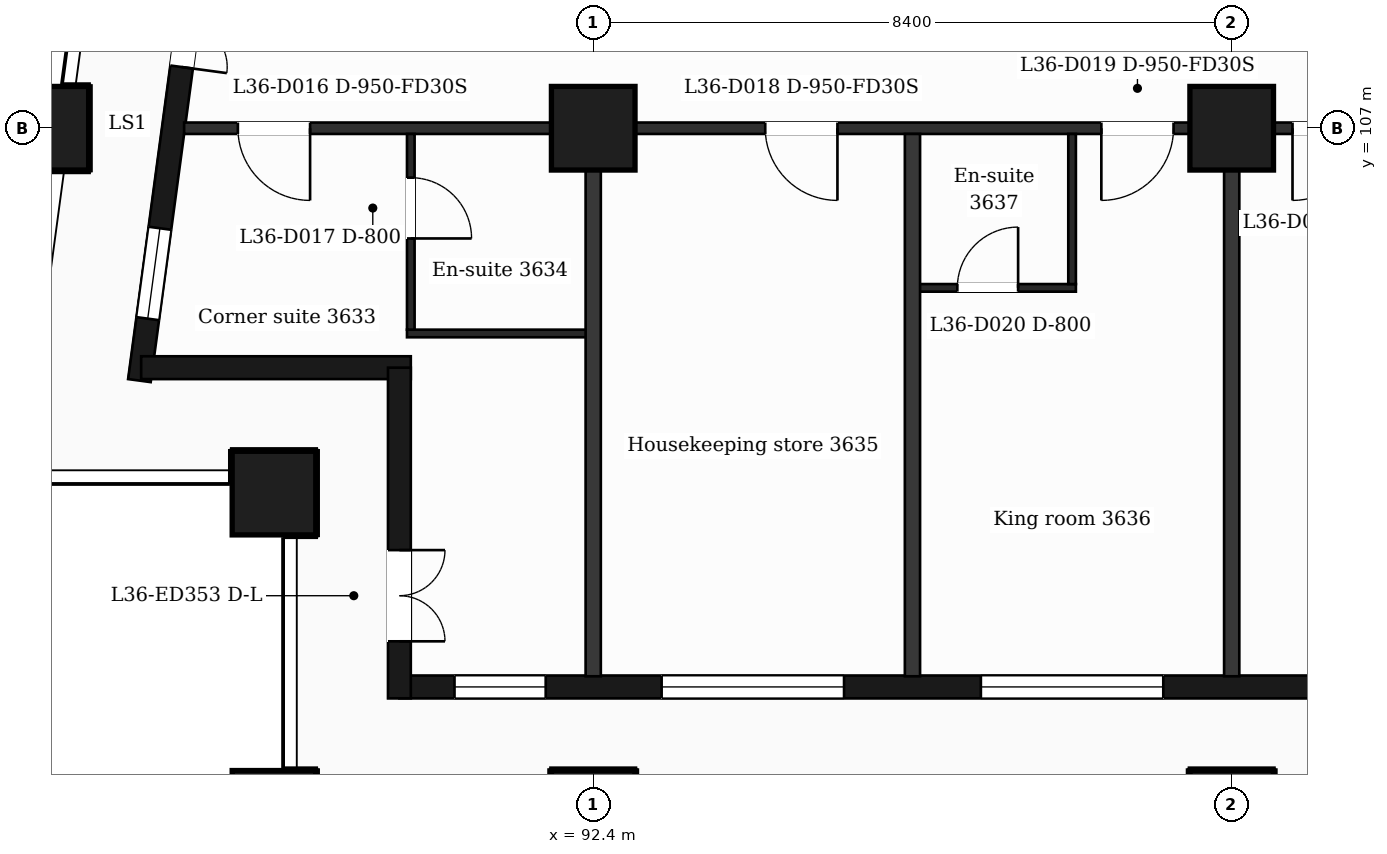
"""IFC4 building model, lengths in metres.
Left out: names, types, materials, properties, quantities, classifications, styles, units other than length and angle.
Written with IfcOpenShell. Run it as: python <this file> out.ifc"""

import sys

from ifc_helpers import new_model, si_unit, direction, frame, frame_2d, origin, origin_2d, place, context, subcontext, project, spatial, rectangle, extrude, element, fill, save


model = new_model("IFC4")
c1 = context("Model", 3, precision=1e-05, world=origin(), true_north=direction((0.0, 1.0)))
c2 = subcontext(c1, "Body", "Model", "MODEL_VIEW")
j1 = project(units=[si_unit("LENGTHUNIT", "METRE"), si_unit("PLANEANGLEUNIT", "RADIAN")], contexts=[c1])
p1 = place(None, origin())
s1 = spatial("IfcSite", under=j1, at=p1, CompositionType="ELEMENT")
p2 = place(p1, origin())
s2 = spatial("IfcBuilding", under=s1, at=p2, CompositionType="ELEMENT")
p3 = place(p2, frame((0.0, 0.0, 155.2)))
s3 = spatial("IfcBuildingStorey", under=s2, at=p3, CompositionType="ELEMENT", Elevation=155.2)
for number, where, z_axis, x_axis in (
    (1, (92.4, 98.0, 0.0), (0.0, 0.0, 1.0), (1.0, 0.0, 0.0)),
    (2, (100.8, 98.0, 0.0), (0.0, 0.0, 1.0), (1.0, 0.0, 0.0)),
    (3, (88.2, 98.0, 0.0), (0.0, 0.0, 1.0), (1.0, 0.0, 0.0)),
    (4, (88.2, 102.2, 0.0), (0.0, 0.0, 1.0), (1.0, 0.0, 0.0)),
    (5, (92.4, 107.0, 0.0), (0.0, 0.0, 1.0), (1.0, 0.0, 0.0)),
    (6, (100.8, 107.0, 0.0), (0.0, 0.0, 1.0), (1.0, 0.0, 0.0)),
    (7, (85.211, 107.0, 0.0), (0.0, 0.0, 1.0), (1.0, 0.0, 0.0)),
):
    element("IfcColumn", number, at=place(p3, frame(where, z_axis=z_axis, x_axis=x_axis)), inside=s3, PredefinedType="COLUMN", context=c2, shape_type="SweptSolid", body=[
        extrude(rectangle(XDim=1.1, YDim=1.1, at=origin_2d()), origin(), (0.0, 0.0, 1.0), 3.7),
    ])
p4 = place(p3, frame((89.85, 99.65, 0.0), z_axis=(0.0, 0.0, 1.0), x_axis=(1.0, 0.0, 0.0)))
e8 = element("IfcWall", 8, at=p4, inside=s3, PredefinedType="SOLIDWALL", context=c2, shape_type="SweptSolid", body=[
    extrude(rectangle(XDim=47.25, YDim=0.3, at=frame_2d((23.625, 0.0))), origin(), (0.0, 0.0, 1.0), 3.38),
])
p5 = place(p4, frame((0.725, 0.0, 0.9)))
e9 = element("IfcOpeningElement", 9, at=p5, cuts=e8, PredefinedType="OPENING", context=c2, shape_type="SweptSolid", body=[
    extrude(rectangle(XDim=1.2, YDim=2.1, at=frame_2d((0.6, 1.05))), frame((0.0, 0.16, 0.0), z_axis=(0.0, -1.0, 0.0), x_axis=(1.0, 0.0, 0.0)), (0.0, 0.0, 1.0), 0.32),
])
p6 = place(p4, frame((3.45, 0.0, 0.9)))
e10 = element("IfcOpeningElement", 10, at=p6, cuts=e8, PredefinedType="OPENING", context=c2, shape_type="SweptSolid", body=[
    extrude(rectangle(XDim=2.4, YDim=2.1, at=frame_2d((1.2, 1.05))), frame((0.0, 0.16, 0.0), z_axis=(0.0, -1.0, 0.0), x_axis=(1.0, 0.0, 0.0)), (0.0, 0.0, 1.0), 0.32),
])
p7 = place(p4, frame((7.65, 0.0, 0.9)))
e11 = element("IfcOpeningElement", 11, at=p7, cuts=e8, PredefinedType="OPENING", context=c2, shape_type="SweptSolid", body=[
    extrude(rectangle(XDim=2.4, YDim=2.1, at=frame_2d((1.2, 1.05))), frame((0.0, 0.16, 0.0), z_axis=(0.0, -1.0, 0.0), x_axis=(1.0, 0.0, 0.0)), (0.0, 0.0, 1.0), 0.32),
])
p8 = place(p4, frame((12.45, 0.0, 0.9)))
e12 = element("IfcOpeningElement", 12, at=p8, cuts=e8, PredefinedType="OPENING", context=c2, shape_type="SweptSolid", body=[
    extrude(rectangle(XDim=1.2, YDim=2.1, at=frame_2d((0.6, 1.05))), frame((0.0, 0.16, 0.0), z_axis=(0.0, -1.0, 0.0), x_axis=(1.0, 0.0, 0.0)), (0.0, 0.0, 1.0), 0.32),
])
p9 = place(p4, frame((16.65, 0.0, 0.9)))
e13 = element("IfcOpeningElement", 13, at=p9, cuts=e8, PredefinedType="OPENING", context=c2, shape_type="SweptSolid", body=[
    extrude(rectangle(XDim=1.2, YDim=2.1, at=frame_2d((0.6, 1.05))), frame((0.0, 0.16, 0.0), z_axis=(0.0, -1.0, 0.0), x_axis=(1.0, 0.0, 0.0)), (0.0, 0.0, 1.0), 0.32),
])
p10 = place(p4, frame((19.95, 0.0, 0.0)))
e14 = element("IfcOpeningElement", 14, at=p10, cuts=e8, PredefinedType="OPENING", context=c2, shape_type="SweptSolid", body=[
    extrude(rectangle(XDim=1.2, YDim=2.4, at=frame_2d((0.6, 1.2))), frame((0.0, 0.16, 0.0), z_axis=(0.0, -1.0, 0.0), x_axis=(1.0, 0.0, 0.0)), (0.0, 0.0, 1.0), 0.32),
])
p11 = place(p4, frame((21.75, 0.0, 0.9)))
e15 = element("IfcOpeningElement", 15, at=p11, cuts=e8, PredefinedType="OPENING", context=c2, shape_type="SweptSolid", body=[
    extrude(rectangle(XDim=1.2, YDim=2.1, at=frame_2d((0.6, 1.05))), frame((0.0, 0.16, 0.0), z_axis=(0.0, -1.0, 0.0), x_axis=(1.0, 0.0, 0.0)), (0.0, 0.0, 1.0), 0.32),
])
p12 = place(p4, frame((24.45, 0.0, 0.9)))
e16 = element("IfcOpeningElement", 16, at=p12, cuts=e8, PredefinedType="OPENING", context=c2, shape_type="SweptSolid", body=[
    extrude(rectangle(XDim=2.4, YDim=2.1, at=frame_2d((1.2, 1.05))), frame((0.0, 0.16, 0.0), z_axis=(0.0, -1.0, 0.0), x_axis=(1.0, 0.0, 0.0)), (0.0, 0.0, 1.0), 0.32),
])
p13 = place(p4, frame((28.35, 0.0, 0.0)))
e17 = element("IfcOpeningElement", 17, at=p13, cuts=e8, PredefinedType="OPENING", context=c2, shape_type="SweptSolid", body=[
    extrude(rectangle(XDim=1.2, YDim=2.4, at=frame_2d((0.6, 1.2))), frame((0.0, 0.16, 0.0), z_axis=(0.0, -1.0, 0.0), x_axis=(1.0, 0.0, 0.0)), (0.0, 0.0, 1.0), 0.32),
])
p14 = place(p4, frame((30.15, 0.0, 0.9)))
e18 = element("IfcOpeningElement", 18, at=p14, cuts=e8, PredefinedType="OPENING", context=c2, shape_type="SweptSolid", body=[
    extrude(rectangle(XDim=1.2, YDim=2.1, at=frame_2d((0.6, 1.05))), frame((0.0, 0.16, 0.0), z_axis=(0.0, -1.0, 0.0), x_axis=(1.0, 0.0, 0.0)), (0.0, 0.0, 1.0), 0.32),
])
p15 = place(p4, frame((32.85, 0.0, 0.9)))
e19 = element("IfcOpeningElement", 19, at=p15, cuts=e8, PredefinedType="OPENING", context=c2, shape_type="SweptSolid", body=[
    extrude(rectangle(XDim=2.4, YDim=2.1, at=frame_2d((1.2, 1.05))), frame((0.0, 0.16, 0.0), z_axis=(0.0, -1.0, 0.0), x_axis=(1.0, 0.0, 0.0)), (0.0, 0.0, 1.0), 0.32),
])
p16 = place(p4, frame((37.05, 0.0, 0.9)))
e20 = element("IfcOpeningElement", 20, at=p16, cuts=e8, PredefinedType="OPENING", context=c2, shape_type="SweptSolid", body=[
    extrude(rectangle(XDim=2.4, YDim=2.1, at=frame_2d((1.2, 1.05))), frame((0.0, 0.16, 0.0), z_axis=(0.0, -1.0, 0.0), x_axis=(1.0, 0.0, 0.0)), (0.0, 0.0, 1.0), 0.32),
])
p17 = place(p4, frame((41.85, 0.0, 0.9)))
e21 = element("IfcOpeningElement", 21, at=p17, cuts=e8, PredefinedType="OPENING", context=c2, shape_type="SweptSolid", body=[
    extrude(rectangle(XDim=1.2, YDim=2.1, at=frame_2d((0.6, 1.05))), frame((0.0, 0.16, 0.0), z_axis=(0.0, -1.0, 0.0), x_axis=(1.0, 0.0, 0.0)), (0.0, 0.0, 1.0), 0.32),
])
p18 = place(p4, frame((45.25, 0.0, 0.9)))
e22 = element("IfcOpeningElement", 22, at=p18, cuts=e8, PredefinedType="OPENING", context=c2, shape_type="SweptSolid", body=[
    extrude(rectangle(XDim=1.2, YDim=2.1, at=frame_2d((0.6, 1.05))), frame((0.0, 0.16, 0.0), z_axis=(0.0, -1.0, 0.0), x_axis=(1.0, 0.0, 0.0)), (0.0, 0.0, 1.0), 0.32),
])
p19 = place(p3, frame((87.334, 110.4, 0.0), z_axis=(0.0, 0.0, 1.0), x_axis=(-0.133437175554, -0.991057273915, 0.0)))
e23 = element("IfcWall", 23, at=p19, inside=s3, PredefinedType="SOLIDWALL", context=c2, shape_type="SweptSolid", body=[
    extrude(rectangle(XDim=6.781, YDim=0.3, at=frame_2d((3.39, 0.0))), origin(), (0.0, 0.0, 1.0), 3.38),
])
p20 = place(p19, frame((1.418, 0.0, 0.0)))
e24 = element("IfcOpeningElement", 24, at=p20, cuts=e23, PredefinedType="OPENING", context=c2, shape_type="SweptSolid", body=[
    extrude(rectangle(XDim=1.2, YDim=2.4, at=frame_2d((0.6, 1.2))), frame((0.0, 0.16, 0.0), z_axis=(0.0, -1.0, 0.0), x_axis=(1.0, 0.0, 0.0)), (0.0, 0.0, 1.0), 0.32),
])
p21 = place(p19, frame((4.758, 0.0, 0.9)))
e25 = element("IfcOpeningElement", 25, at=p21, cuts=e23, PredefinedType="OPENING", context=c2, shape_type="SweptSolid", body=[
    extrude(rectangle(XDim=1.2, YDim=2.1, at=frame_2d((0.6, 1.05))), frame((0.0, 0.16, 0.0), z_axis=(0.0, -1.0, 0.0), x_axis=(1.0, 0.0, 0.0)), (0.0, 0.0, 1.0), 0.32),
])
p22 = place(p3, frame((86.452, 103.85, 0.0), z_axis=(0.0, 0.0, 1.0), x_axis=(1.0, 0.0, 0.0)))
e26 = element("IfcWall", 26, at=p22, inside=s3, PredefinedType="SOLIDWALL", context=c2, shape_type="SweptSolid", body=[
    extrude(rectangle(XDim=3.548, YDim=0.3, at=frame_2d((1.774, 0.0))), origin(), (0.0, 0.0, 1.0), 3.38),
])
p23 = place(p3, frame((89.85, 103.85, 0.0), z_axis=(0.0, 0.0, 1.0), x_axis=(0.0, -1.0, 0.0)))
e27 = element("IfcWall", 27, at=p23, inside=s3, PredefinedType="SOLIDWALL", context=c2, shape_type="SweptSolid", body=[
    extrude(rectangle(XDim=4.35, YDim=0.3, at=frame_2d((2.175, 0.0))), origin(), (0.0, 0.0, 1.0), 3.38),
])
p24 = place(p23, frame((2.4, 0.0, 0.0)))
e28 = element("IfcOpeningElement", 28, at=p24, cuts=e27, PredefinedType="OPENING", context=c2, shape_type="SweptSolid", body=[
    extrude(rectangle(XDim=1.2, YDim=2.4, at=frame_2d((0.6, 1.2))), frame((0.0, 0.16, 0.0), z_axis=(0.0, -1.0, 0.0), x_axis=(1.0, 0.0, 0.0)), (0.0, 0.0, 1.0), 0.32),
])
p25 = place(p3, frame((89.95, 104.3, 0.0), z_axis=(0.0, 0.0, 1.0), x_axis=(1.0, 0.0, 0.0)))
e29 = element("IfcWall", 29, at=p25, inside=s3, PredefinedType="PARTITIONING", context=c2, shape_type="SweptSolid", body=[
    extrude(rectangle(XDim=2.45, YDim=0.1, at=frame_2d((1.225, 0.0))), origin(), (0.0, 0.0, 1.0), 3.38),
])
p26 = place(p3, frame((96.6, 104.9, 0.0), z_axis=(0.0, 0.0, 1.0), x_axis=(1.0, 0.0, 0.0)))
e30 = element("IfcWall", 30, at=p26, inside=s3, PredefinedType="PARTITIONING", context=c2, shape_type="SweptSolid", body=[
    extrude(rectangle(XDim=2.15, YDim=0.1, at=frame_2d((1.075, 0.0))), origin(), (0.0, 0.0, 1.0), 3.38),
])
p27 = place(p26, frame((0.59, 0.0, 0.0)))
e31 = element("IfcOpeningElement", 31, at=p27, cuts=e30, PredefinedType="OPENING", context=c2, shape_type="SweptSolid", body=[
    extrude(rectangle(XDim=0.8, YDim=2.1, at=frame_2d((0.4, 1.05))), frame((0.0, 0.06, 0.0), z_axis=(0.0, -1.0, 0.0), x_axis=(1.0, 0.0, 0.0)), (0.0, 0.0, 1.0), 0.12),
])
p28 = place(p3, frame((87.018, 107.0, 0.0), z_axis=(0.0, 0.0, 1.0), x_axis=(1.0, 0.0, 0.0)))
e32 = element("IfcWall", 32, at=p28, inside=s3, PredefinedType="PARTITIONING", context=c2, shape_type="SweptSolid", body=[
    extrude(rectangle(XDim=52.765, YDim=0.15, at=frame_2d((26.382, 0.0))), origin(), (0.0, 0.0, 1.0), 3.38),
])
p29 = place(p28, frame((0.707, 0.0, 0.0)))
e33 = element("IfcOpeningElement", 33, at=p29, cuts=e32, PredefinedType="OPENING", context=c2, shape_type="SweptSolid", body=[
    extrude(rectangle(XDim=0.95, YDim=2.1, at=frame_2d((0.475, 1.05))), frame((0.0, 0.085, 0.0), z_axis=(0.0, -1.0, 0.0), x_axis=(1.0, 0.0, 0.0)), (0.0, 0.0, 1.0), 0.17),
])
p30 = place(p28, frame((7.645, 0.0, 0.0)))
e34 = element("IfcOpeningElement", 34, at=p30, cuts=e32, PredefinedType="OPENING", context=c2, shape_type="SweptSolid", body=[
    extrude(rectangle(XDim=0.95, YDim=2.1, at=frame_2d((0.475, 1.05))), frame((0.0, 0.085, 0.0), z_axis=(0.0, -1.0, 0.0), x_axis=(1.0, 0.0, 0.0)), (0.0, 0.0, 1.0), 0.17),
])
p31 = place(p28, frame((12.067, 0.0, 0.0)))
e35 = element("IfcOpeningElement", 35, at=p31, cuts=e32, PredefinedType="OPENING", context=c2, shape_type="SweptSolid", body=[
    extrude(rectangle(XDim=0.95, YDim=2.1, at=frame_2d((0.475, 1.05))), frame((0.0, 0.085, 0.0), z_axis=(0.0, -1.0, 0.0), x_axis=(1.0, 0.0, 0.0)), (0.0, 0.0, 1.0), 0.17),
])
p32 = place(p28, frame((14.582, 0.0, 0.0)))
e36 = element("IfcOpeningElement", 36, at=p32, cuts=e32, PredefinedType="OPENING", context=c2, shape_type="SweptSolid", body=[
    extrude(rectangle(XDim=0.95, YDim=2.1, at=frame_2d((0.475, 1.05))), frame((0.0, 0.085, 0.0), z_axis=(0.0, -1.0, 0.0), x_axis=(1.0, 0.0, 0.0)), (0.0, 0.0, 1.0), 0.17),
])
p33 = place(p28, frame((20.432, 0.0, 0.0)))
e37 = element("IfcOpeningElement", 37, at=p33, cuts=e32, PredefinedType="OPENING", context=c2, shape_type="SweptSolid", body=[
    extrude(rectangle(XDim=0.95, YDim=2.1, at=frame_2d((0.475, 1.05))), frame((0.0, 0.085, 0.0), z_axis=(0.0, -1.0, 0.0), x_axis=(1.0, 0.0, 0.0)), (0.0, 0.0, 1.0), 0.17),
])
p34 = place(p28, frame((23.532, 0.0, 0.0)))
e38 = element("IfcOpeningElement", 38, at=p34, cuts=e32, PredefinedType="OPENING", context=c2, shape_type="SweptSolid", body=[
    extrude(rectangle(XDim=1.0, YDim=2.1, at=frame_2d((0.5, 1.05))), frame((0.0, 0.085, 0.0), z_axis=(0.0, -1.0, 0.0), x_axis=(1.0, 0.0, 0.0)), (0.0, 0.0, 1.0), 0.17),
])
p35 = place(p28, frame((36.807, 0.0, 0.0)))
e39 = element("IfcOpeningElement", 39, at=p35, cuts=e32, PredefinedType="OPENING", context=c2, shape_type="SweptSolid", body=[
    extrude(rectangle(XDim=1.0, YDim=2.1, at=frame_2d((0.5, 1.05))), frame((0.0, 0.085, 0.0), z_axis=(0.0, -1.0, 0.0), x_axis=(1.0, 0.0, 0.0)), (0.0, 0.0, 1.0), 0.17),
])
p36 = place(p28, frame((43.457, 0.0, 0.0)))
e40 = element("IfcOpeningElement", 40, at=p36, cuts=e32, PredefinedType="OPENING", context=c2, shape_type="SweptSolid", body=[
    extrude(rectangle(XDim=0.95, YDim=2.1, at=frame_2d((0.475, 1.05))), frame((0.0, 0.085, 0.0), z_axis=(0.0, -1.0, 0.0), x_axis=(1.0, 0.0, 0.0)), (0.0, 0.0, 1.0), 0.17),
])
p37 = place(p28, frame((48.974, 0.0, 0.0)))
e41 = element("IfcOpeningElement", 41, at=p37, cuts=e32, PredefinedType="OPENING", context=c2, shape_type="SweptSolid", body=[
    extrude(rectangle(XDim=0.95, YDim=2.1, at=frame_2d((0.475, 1.05))), frame((0.0, 0.085, 0.0), z_axis=(0.0, -1.0, 0.0), x_axis=(1.0, 0.0, 0.0)), (0.0, 0.0, 1.0), 0.17),
])
p38 = place(p3, frame((90.0, 104.35, 0.0), z_axis=(0.0, 0.0, 1.0), x_axis=(0.0, 1.0, 0.0)))
e42 = element("IfcWall", 42, at=p38, inside=s3, PredefinedType="PARTITIONING", context=c2, shape_type="SweptSolid", body=[
    extrude(rectangle(XDim=2.575, YDim=0.1, at=frame_2d((1.288, 0.0))), origin(), (0.0, 0.0, 1.0), 3.38),
])
p39 = place(p38, frame((1.2, 0.0, 0.0)))
e43 = element("IfcOpeningElement", 43, at=p39, cuts=e42, PredefinedType="OPENING", context=c2, shape_type="SweptSolid", body=[
    extrude(rectangle(XDim=0.8, YDim=2.1, at=frame_2d((0.4, 1.05))), frame((0.0, 0.06, 0.0), z_axis=(0.0, -1.0, 0.0), x_axis=(1.0, 0.0, 0.0)), (0.0, 0.0, 1.0), 0.12),
])
for number, where, z_axis, x_axis in (
    (44, (92.4, 99.79, 0.0), (0.0, 0.0, 1.0), (0.0, 1.0, 0.0)),
    (45, (96.6, 99.79, 0.0), (0.0, 0.0, 1.0), (0.0, 1.0, 0.0)),
):
    element("IfcWall", number, at=place(p3, frame(where, z_axis=z_axis, x_axis=x_axis)), inside=s3, PredefinedType="PARTITIONING", context=c2, shape_type="SweptSolid", body=[
        extrude(rectangle(XDim=7.135, YDim=0.2, at=frame_2d((3.567, 0.0))), origin(), (0.0, 0.0, 1.0), 3.38),
    ])
p40 = place(p3, frame((98.7, 104.95, 0.0), z_axis=(0.0, 0.0, 1.0), x_axis=(0.0, 1.0, 0.0)))
e46 = element("IfcWall", 46, at=p40, inside=s3, PredefinedType="PARTITIONING", context=c2, shape_type="SweptSolid", body=[
    extrude(rectangle(XDim=1.975, YDim=0.1, at=frame_2d((0.988, 0.0))), origin(), (0.0, 0.0, 1.0), 3.38),
])
p41 = place(p3, frame((100.8, 99.79, 0.0), z_axis=(0.0, 0.0, 1.0), x_axis=(0.0, 1.0, 0.0)))
e47 = element("IfcWall", 47, at=p41, inside=s3, PredefinedType="PARTITIONING", context=c2, shape_type="SweptSolid", body=[
    extrude(rectangle(XDim=7.135, YDim=0.2, at=frame_2d((3.567, 0.0))), origin(), (0.0, 0.0, 1.0), 3.38),
])
p42 = place(p5, origin())
e48 = element("IfcWindow", 48, at=p42, inside=s3, PartitioningType="SINGLE_PANEL", PredefinedType="WINDOW", context=c2, shape_type="SweptSolid", body=[
    extrude(rectangle(XDim=1.2, YDim=2.1, at=frame_2d((0.6, 1.05))), frame((0.0, 0.03, 0.0), z_axis=(0.0, -1.0, 0.0), x_axis=(1.0, 0.0, 0.0)), (0.0, 0.0, 1.0), 0.06),
])
fill(e9, e48)
p43 = place(p6, origin())
e49 = element("IfcWindow", 49, at=p43, inside=s3, PartitioningType="SINGLE_PANEL", PredefinedType="WINDOW", context=c2, shape_type="SweptSolid", body=[
    extrude(rectangle(XDim=2.4, YDim=2.1, at=frame_2d((1.2, 1.05))), frame((0.0, 0.03, 0.0), z_axis=(0.0, -1.0, 0.0), x_axis=(1.0, 0.0, 0.0)), (0.0, 0.0, 1.0), 0.06),
])
fill(e10, e49)
p44 = place(p7, origin())
e50 = element("IfcWindow", 50, at=p44, inside=s3, PartitioningType="SINGLE_PANEL", PredefinedType="WINDOW", context=c2, shape_type="SweptSolid", body=[
    extrude(rectangle(XDim=2.4, YDim=2.1, at=frame_2d((1.2, 1.05))), frame((0.0, 0.03, 0.0), z_axis=(0.0, -1.0, 0.0), x_axis=(1.0, 0.0, 0.0)), (0.0, 0.0, 1.0), 0.06),
])
fill(e11, e50)
p45 = place(p20, origin())
e51 = element("IfcDoor", 51, at=p45, inside=s3, OperationType="DOUBLE_DOOR_SINGLE_SWING", PredefinedType="DOOR", context=c2, shape_type="SweptSolid", body=[
    extrude(rectangle(XDim=1.2, YDim=2.4, at=frame_2d((0.6, 1.2))), frame((0.0, 0.025, 0.0), z_axis=(0.0, -1.0, 0.0), x_axis=(1.0, 0.0, 0.0)), (0.0, 0.0, 1.0), 0.05),
])
fill(e24, e51)
p46 = place(p21, origin())
e52 = element("IfcWindow", 52, at=p46, inside=s3, PartitioningType="SINGLE_PANEL", PredefinedType="WINDOW", context=c2, shape_type="SweptSolid", body=[
    extrude(rectangle(XDim=1.2, YDim=2.1, at=frame_2d((0.6, 1.05))), frame((0.0, 0.03, 0.0), z_axis=(0.0, -1.0, 0.0), x_axis=(1.0, 0.0, 0.0)), (0.0, 0.0, 1.0), 0.06),
])
fill(e25, e52)
p47 = place(p24, origin())
e53 = element("IfcDoor", 53, at=p47, inside=s3, OperationType="DOUBLE_DOOR_SINGLE_SWING", PredefinedType="DOOR", context=c2, shape_type="SweptSolid", body=[
    extrude(rectangle(XDim=1.2, YDim=2.4, at=frame_2d((0.6, 1.2))), frame((0.0, 0.025, 0.0), z_axis=(0.0, -1.0, 0.0), x_axis=(1.0, 0.0, 0.0)), (0.0, 0.0, 1.0), 0.05),
])
fill(e28, e53)
p48 = place(p29, origin())
e54 = element("IfcDoor", 54, at=p48, inside=s3, OperationType="SINGLE_SWING_RIGHT", PredefinedType="DOOR", context=c2, shape_type="SweptSolid", body=[
    extrude(rectangle(XDim=0.95, YDim=2.1, at=frame_2d((0.475, 1.05))), frame((0.0, 0.025, 0.0), z_axis=(0.0, -1.0, 0.0), x_axis=(1.0, 0.0, 0.0)), (0.0, 0.0, 1.0), 0.05),
])
fill(e33, e54)
p49 = place(p39, origin())
e55 = element("IfcDoor", 55, at=p49, inside=s3, OperationType="SINGLE_SWING_LEFT", PredefinedType="DOOR", context=c2, shape_type="SweptSolid", body=[
    extrude(rectangle(XDim=0.8, YDim=2.1, at=frame_2d((0.4, 1.05))), frame((0.0, 0.025, 0.0), z_axis=(0.0, -1.0, 0.0), x_axis=(1.0, 0.0, 0.0)), (0.0, 0.0, 1.0), 0.05),
])
fill(e43, e55)
p50 = place(p30, origin())
e56 = element("IfcDoor", 56, at=p50, inside=s3, OperationType="SINGLE_SWING_RIGHT", PredefinedType="DOOR", context=c2, shape_type="SweptSolid", body=[
    extrude(rectangle(XDim=0.95, YDim=2.1, at=frame_2d((0.475, 1.05))), frame((0.0, 0.025, 0.0), z_axis=(0.0, -1.0, 0.0), x_axis=(1.0, 0.0, 0.0)), (0.0, 0.0, 1.0), 0.05),
])
fill(e34, e56)
p51 = place(p31, origin())
e57 = element("IfcDoor", 57, at=p51, inside=s3, OperationType="SINGLE_SWING_LEFT", PredefinedType="DOOR", context=c2, shape_type="SweptSolid", body=[
    extrude(rectangle(XDim=0.95, YDim=2.1, at=frame_2d((0.475, 1.05))), frame((0.0, 0.025, 0.0), z_axis=(0.0, -1.0, 0.0), x_axis=(1.0, 0.0, 0.0)), (0.0, 0.0, 1.0), 0.05),
])
fill(e35, e57)
p52 = place(p27, origin())
e58 = element("IfcDoor", 58, at=p52, inside=s3, OperationType="SINGLE_SWING_RIGHT", PredefinedType="DOOR", context=c2, shape_type="SweptSolid", body=[
    extrude(rectangle(XDim=0.8, YDim=2.1, at=frame_2d((0.4, 1.05))), frame((0.0, 0.025, 0.0), z_axis=(0.0, -1.0, 0.0), x_axis=(1.0, 0.0, 0.0)), (0.0, 0.0, 1.0), 0.05),
])
fill(e31, e58)
p53 = place(p32, origin())
e59 = element("IfcDoor", 59, at=p53, inside=s3, OperationType="SINGLE_SWING_LEFT", PredefinedType="DOOR", context=c2, shape_type="SweptSolid", body=[
    extrude(rectangle(XDim=0.95, YDim=2.1, at=frame_2d((0.475, 1.05))), frame((0.0, 0.025, 0.0), z_axis=(0.0, -1.0, 0.0), x_axis=(1.0, 0.0, 0.0)), (0.0, 0.0, 1.0), 0.05),
])
fill(e36, e59)
save(model, sys.argv[1])
